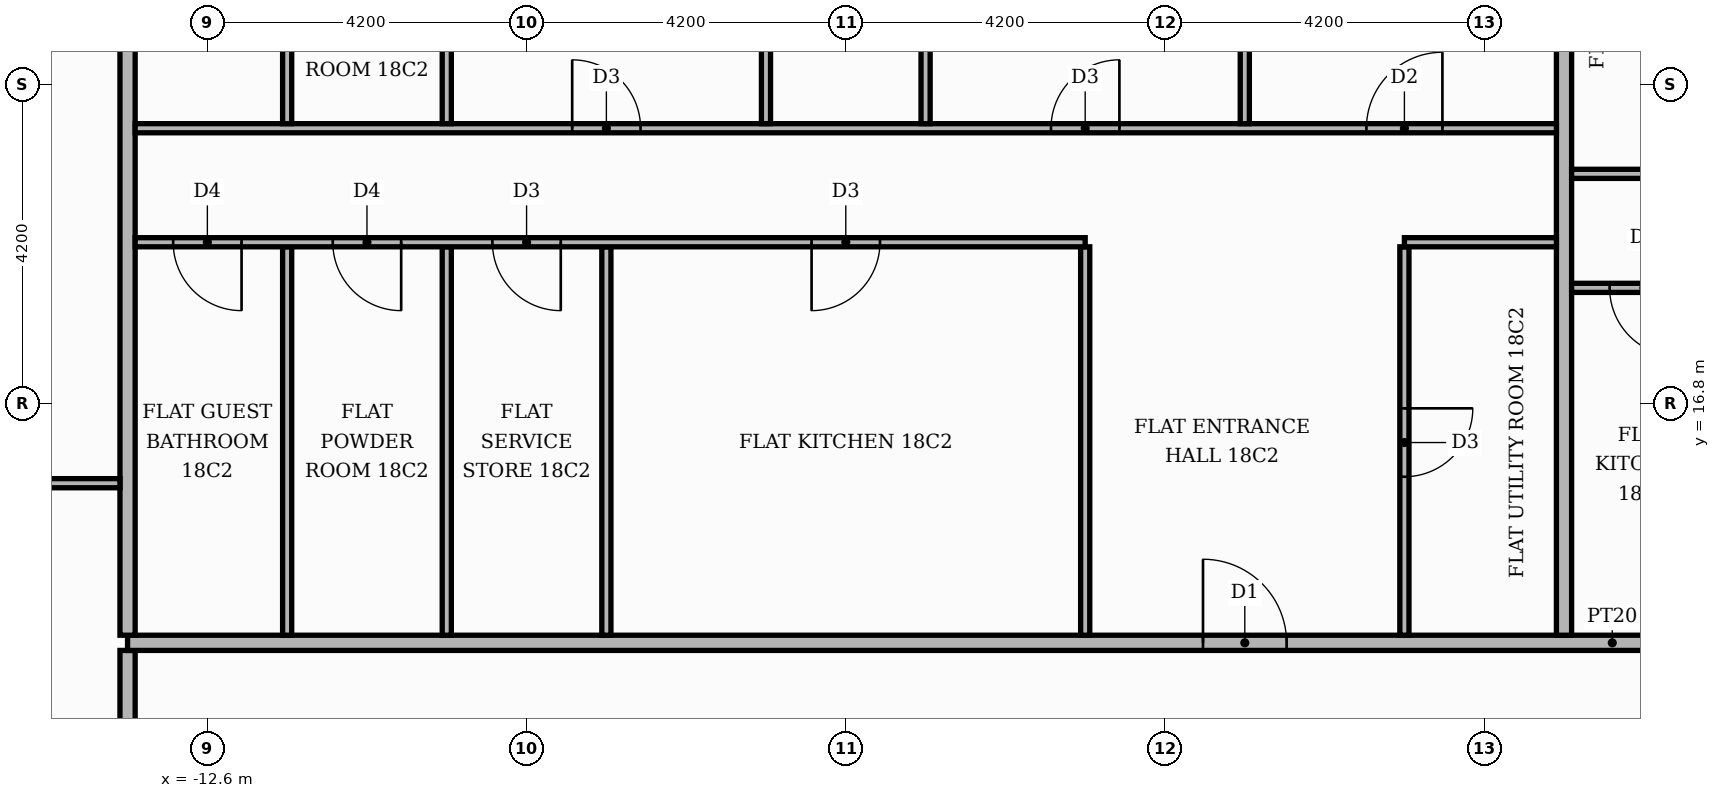
"""IFC4 building model, lengths in metres.
Left out: names, types, materials, properties, quantities, classifications, styles, units other than length and angle.
Written with IfcOpenShell. Run it as: python <this file> out.ifc"""

import sys

from ifc_helpers import new_model, si_unit, direction, frame, frame_2d, origin, place, context, subcontext, project, spatial, rectangle, extrude, element, fill, save


model = new_model("IFC4")
c1 = context("Model", 3, precision=1e-05, world=origin(), true_north=direction((0.0, 1.0)))
c2 = subcontext(c1, "Body", "Model", "MODEL_VIEW")
j1 = project(units=[si_unit("LENGTHUNIT", "METRE"), si_unit("PLANEANGLEUNIT", "RADIAN")], contexts=[c1])
p1 = place(None, origin())
s1 = spatial("IfcSite", under=j1, at=p1, CompositionType="ELEMENT")
p2 = place(p1, origin())
s2 = spatial("IfcBuilding", under=s1, at=p2, CompositionType="ELEMENT")
p3 = place(p2, frame((0.0, 0.0, 79.2)))
s3 = spatial("IfcBuildingStorey", under=s2, at=p3, CompositionType="ELEMENT", Elevation=79.2)
p4 = place(p3, frame((-13.65, 5.35, 0.0), z_axis=(0.0, 0.0, 1.0), x_axis=(0.0, 1.0, 0.0)))
e1 = element("IfcWall", 1, at=p4, inside=s3, PredefinedType="PARTITIONING", context=c2, shape_type="SweptSolid", body=[
    extrude(rectangle(XDim=8.2, YDim=0.2, at=frame_2d((4.1, 0.0))), origin(), (0.0, 0.0, 1.0), 3.48),
])
p5 = place(p4, frame((5.65, 0.0, 0.0)))
e2 = element("IfcOpeningElement", 2, at=p5, cuts=e1, PredefinedType="OPENING", context=c2, shape_type="SweptSolid", body=[
    extrude(rectangle(XDim=1.1, YDim=2.4, at=frame_2d((0.55, 1.2))), frame((0.0, 0.11, 0.0), z_axis=(0.0, -1.0, 0.0), x_axis=(1.0, 0.0, 0.0)), (0.0, 0.0, 1.0), 0.22),
])
p6 = place(p3, frame((-13.65, 13.65, 0.0), z_axis=(0.0, 0.0, 1.0), x_axis=(1.0, 0.0, 0.0)))
e3 = element("IfcWall", 3, at=p6, inside=s3, PredefinedType="PARTITIONING", context=c2, shape_type="SweptSolid", body=[
    extrude(rectangle(XDim=39.07, YDim=0.2, at=frame_2d((19.535, 0.0))), origin(), (0.0, 0.0, 1.0), 3.48),
])
p7 = place(p6, frame((24.65, 0.0, 0.0)))
e4 = element("IfcOpeningElement", 4, at=p7, cuts=e3, PredefinedType="OPENING", context=c2, shape_type="SweptSolid", body=[
    extrude(rectangle(XDim=1.1, YDim=2.4, at=frame_2d((0.55, 1.2))), frame((0.0, 0.11, 0.0), z_axis=(0.0, -1.0, 0.0), x_axis=(1.0, 0.0, 0.0)), (0.0, 0.0, 1.0), 0.22),
])
p8 = place(p6, frame((14.15, 0.0, 0.0)))
e5 = element("IfcOpeningElement", 5, at=p8, cuts=e3, PredefinedType="OPENING", context=c2, shape_type="SweptSolid", body=[
    extrude(rectangle(XDim=1.1, YDim=2.4, at=frame_2d((0.55, 1.2))), frame((0.0, 0.11, 0.0), z_axis=(0.0, -1.0, 0.0), x_axis=(1.0, 0.0, 0.0)), (0.0, 0.0, 1.0), 0.22),
])
p9 = place(p3, frame((-13.65, 13.75, 0.0), z_axis=(0.0, 0.0, 1.0), x_axis=(0.0, 1.0, 0.0)))
e6 = element("IfcWall", 6, at=p9, inside=s3, PredefinedType="PARTITIONING", context=c2, shape_type="SweptSolid", body=[
    extrude(rectangle(XDim=11.67, YDim=0.2, at=frame_2d((5.835, 0.0))), origin(), (0.0, 0.0, 1.0), 3.48),
])
for number, where, z_axis, x_axis in (
    (7, (-11.55, 13.75, 0.0), (0.0, 0.0, 1.0), (0.0, 1.0, 0.0)),
    (8, (-9.45, 13.75, 0.0), (0.0, 0.0, 1.0), (0.0, 1.0, 0.0)),
    (9, (-7.35, 13.75, 0.0), (0.0, 0.0, 1.0), (0.0, 1.0, 0.0)),
    (10, (-1.05, 13.75, 0.0), (0.0, 0.0, 1.0), (0.0, 1.0, 0.0)),
):
    element("IfcWall", number, at=place(p3, frame(where, z_axis=z_axis, x_axis=x_axis)), inside=s3, PredefinedType="PARTITIONING", context=c2, shape_type="SweptSolid", body=[
        extrude(rectangle(XDim=5.11, YDim=0.12, at=frame_2d((2.555, 0.0))), origin(), (0.0, 0.0, 1.0), 3.48),
    ])
p10 = place(p3, frame((3.15, 13.75, 0.0), z_axis=(0.0, 0.0, 1.0), x_axis=(0.0, 1.0, 0.0)))
e11 = element("IfcWall", 11, at=p10, inside=s3, PredefinedType="PARTITIONING", context=c2, shape_type="SweptSolid", body=[
    extrude(rectangle(XDim=5.11, YDim=0.12, at=frame_2d((2.555, 0.0))), origin(), (0.0, 0.0, 1.0), 3.48),
])
p11 = place(p10, frame((2.085, 0.0, 0.0)))
e12 = element("IfcOpeningElement", 12, at=p11, cuts=e11, PredefinedType="OPENING", context=c2, shape_type="SweptSolid", body=[
    extrude(rectangle(XDim=0.9, YDim=2.1, at=frame_2d((0.45, 1.05))), frame((0.0, 0.07, 0.0), z_axis=(0.0, -1.0, 0.0), x_axis=(1.0, 0.0, 0.0)), (0.0, 0.0, 1.0), 0.14),
])
p12 = place(p3, frame((5.25, 13.75, 0.0), z_axis=(0.0, 0.0, 1.0), x_axis=(0.0, 1.0, 0.0)))
e13 = element("IfcWall", 13, at=p12, inside=s3, PredefinedType="PARTITIONING", context=c2, shape_type="SweptSolid", body=[
    extrude(rectangle(XDim=11.67, YDim=0.2, at=frame_2d((5.835, 0.0))), origin(), (0.0, 0.0, 1.0), 3.48),
])
p13 = place(p3, frame((-19.82, 15.75, 0.0), z_axis=(0.0, 0.0, 1.0), x_axis=(1.0, 0.0, 0.0)))
e14 = element("IfcWall", 14, at=p13, inside=s3, PredefinedType="PARTITIONING", context=c2, shape_type="SweptSolid", body=[
    extrude(rectangle(XDim=6.07, YDim=0.12, at=frame_2d((3.035, 0.0))), origin(), (0.0, 0.0, 1.0), 3.48),
])
p14 = place(p13, frame((2.585, 0.0, 0.0)))
e15 = element("IfcOpeningElement", 15, at=p14, cuts=e14, PredefinedType="OPENING", context=c2, shape_type="SweptSolid", body=[
    extrude(rectangle(XDim=1.0, YDim=2.1, at=frame_2d((0.5, 1.05))), frame((0.0, 0.07, 0.0), z_axis=(0.0, -1.0, 0.0), x_axis=(1.0, 0.0, 0.0)), (0.0, 0.0, 1.0), 0.14),
])
p15 = place(p3, frame((5.35, 18.32, 0.0), z_axis=(0.0, 0.0, 1.0), x_axis=(1.0, 0.0, 0.0)))
e16 = element("IfcWall", 16, at=p15, inside=s3, PredefinedType="PARTITIONING", context=c2, shape_type="SweptSolid", body=[
    extrude(rectangle(XDim=4.1, YDim=0.12, at=frame_2d((2.05, 0.0))), origin(), (0.0, 0.0, 1.0), 3.48),
])
p16 = place(p15, frame((0.5, 0.0, 0.0)))
e17 = element("IfcOpeningElement", 17, at=p16, cuts=e16, PredefinedType="OPENING", context=c2, shape_type="SweptSolid", body=[
    extrude(rectangle(XDim=0.9, YDim=2.1, at=frame_2d((0.45, 1.05))), frame((0.0, 0.07, 0.0), z_axis=(0.0, -1.0, 0.0), x_axis=(1.0, 0.0, 0.0)), (0.0, 0.0, 1.0), 0.14),
])
p17 = place(p3, frame((-13.55, 18.92, 0.0), z_axis=(0.0, 0.0, 1.0), x_axis=(1.0, 0.0, 0.0)))
e18 = element("IfcWall", 18, at=p17, inside=s3, PredefinedType="PARTITIONING", context=c2, shape_type="SweptSolid", body=[
    extrude(rectangle(XDim=12.5, YDim=0.12, at=frame_2d((6.25, 0.0))), origin(), (0.0, 0.0, 1.0), 3.48),
])
p18 = place(p17, frame((8.9, 0.0, 0.0)))
e19 = element("IfcOpeningElement", 19, at=p18, cuts=e18, PredefinedType="OPENING", context=c2, shape_type="SweptSolid", body=[
    extrude(rectangle(XDim=0.9, YDim=2.1, at=frame_2d((0.45, 1.05))), frame((0.0, 0.07, 0.0), z_axis=(0.0, -1.0, 0.0), x_axis=(1.0, 0.0, 0.0)), (0.0, 0.0, 1.0), 0.14),
])
p19 = place(p17, frame((4.7, 0.0, 0.0)))
e20 = element("IfcOpeningElement", 20, at=p19, cuts=e18, PredefinedType="OPENING", context=c2, shape_type="SweptSolid", body=[
    extrude(rectangle(XDim=0.9, YDim=2.1, at=frame_2d((0.45, 1.05))), frame((0.0, 0.07, 0.0), z_axis=(0.0, -1.0, 0.0), x_axis=(1.0, 0.0, 0.0)), (0.0, 0.0, 1.0), 0.14),
])
p20 = place(p17, frame((2.6, 0.0, 0.0)))
e21 = element("IfcOpeningElement", 21, at=p20, cuts=e18, PredefinedType="OPENING", context=c2, shape_type="SweptSolid", body=[
    extrude(rectangle(XDim=0.9, YDim=2.1, at=frame_2d((0.45, 1.05))), frame((0.0, 0.07, 0.0), z_axis=(0.0, -1.0, 0.0), x_axis=(1.0, 0.0, 0.0)), (0.0, 0.0, 1.0), 0.14),
])
p21 = place(p17, frame((0.5, 0.0, 0.0)))
e22 = element("IfcOpeningElement", 22, at=p21, cuts=e18, PredefinedType="OPENING", context=c2, shape_type="SweptSolid", body=[
    extrude(rectangle(XDim=0.9, YDim=2.1, at=frame_2d((0.45, 1.05))), frame((0.0, 0.07, 0.0), z_axis=(0.0, -1.0, 0.0), x_axis=(1.0, 0.0, 0.0)), (0.0, 0.0, 1.0), 0.14),
])
p22 = place(p3, frame((3.15, 18.92, 0.0), z_axis=(0.0, 0.0, 1.0), x_axis=(1.0, 0.0, 0.0)))
e23 = element("IfcWall", 23, at=p22, inside=s3, PredefinedType="PARTITIONING", context=c2, shape_type="SweptSolid", body=[
    extrude(rectangle(XDim=2.0, YDim=0.12, at=frame_2d((1.0, 0.0))), origin(), (0.0, 0.0, 1.0), 3.48),
])
p23 = place(p3, frame((5.35, 19.82, 0.0), z_axis=(0.0, 0.0, 1.0), x_axis=(1.0, 0.0, 0.0)))
e24 = element("IfcWall", 24, at=p23, inside=s3, PredefinedType="PARTITIONING", context=c2, shape_type="SweptSolid", body=[
    extrude(rectangle(XDim=12.05, YDim=0.12, at=frame_2d((6.025, 0.0))), origin(), (0.0, 0.0, 1.0), 3.48),
])
p24 = place(p23, frame((8.85, 0.0, 0.0)))
e25 = element("IfcOpeningElement", 25, at=p24, cuts=e24, PredefinedType="OPENING", context=c2, shape_type="SweptSolid", body=[
    extrude(rectangle(XDim=1.0, YDim=2.1, at=frame_2d((0.5, 1.05))), frame((0.0, 0.07, 0.0), z_axis=(0.0, -1.0, 0.0), x_axis=(1.0, 0.0, 0.0)), (0.0, 0.0, 1.0), 0.14),
])
p25 = place(p23, frame((5.75, 0.0, 0.0)))
e26 = element("IfcOpeningElement", 26, at=p25, cuts=e24, PredefinedType="OPENING", context=c2, shape_type="SweptSolid", body=[
    extrude(rectangle(XDim=0.9, YDim=2.1, at=frame_2d((0.45, 1.05))), frame((0.0, 0.07, 0.0), z_axis=(0.0, -1.0, 0.0), x_axis=(1.0, 0.0, 0.0)), (0.0, 0.0, 1.0), 0.14),
])
p26 = place(p3, frame((-13.55, 20.42, 0.0), z_axis=(0.0, 0.0, 1.0), x_axis=(1.0, 0.0, 0.0)))
e27 = element("IfcWall", 27, at=p26, inside=s3, PredefinedType="PARTITIONING", context=c2, shape_type="SweptSolid", body=[
    extrude(rectangle(XDim=18.7, YDim=0.12, at=frame_2d((9.35, 0.0))), origin(), (0.0, 0.0, 1.0), 3.48),
])
p27 = place(p26, frame((16.2, 0.0, 0.0)))
e28 = element("IfcOpeningElement", 28, at=p27, cuts=e27, PredefinedType="OPENING", context=c2, shape_type="SweptSolid", body=[
    extrude(rectangle(XDim=1.0, YDim=2.1, at=frame_2d((0.5, 1.05))), frame((0.0, 0.07, 0.0), z_axis=(0.0, -1.0, 0.0), x_axis=(1.0, 0.0, 0.0)), (0.0, 0.0, 1.0), 0.14),
])
p28 = place(p26, frame((12.05, 0.0, 0.0)))
e29 = element("IfcOpeningElement", 29, at=p28, cuts=e27, PredefinedType="OPENING", context=c2, shape_type="SweptSolid", body=[
    extrude(rectangle(XDim=0.9, YDim=2.1, at=frame_2d((0.45, 1.05))), frame((0.0, 0.07, 0.0), z_axis=(0.0, -1.0, 0.0), x_axis=(1.0, 0.0, 0.0)), (0.0, 0.0, 1.0), 0.14),
])
p29 = place(p26, frame((5.75, 0.0, 0.0)))
e30 = element("IfcOpeningElement", 30, at=p29, cuts=e27, PredefinedType="OPENING", context=c2, shape_type="SweptSolid", body=[
    extrude(rectangle(XDim=0.9, YDim=2.1, at=frame_2d((0.45, 1.05))), frame((0.0, 0.07, 0.0), z_axis=(0.0, -1.0, 0.0), x_axis=(1.0, 0.0, 0.0)), (0.0, 0.0, 1.0), 0.14),
])
p30 = place(p3, frame((-11.55, 20.48, 0.0), z_axis=(0.0, 0.0, 1.0), x_axis=(0.0, 1.0, 0.0)))
e31 = element("IfcWall", 31, at=p30, inside=s3, PredefinedType="PARTITIONING", context=c2, shape_type="SweptSolid", body=[
    extrude(rectangle(XDim=4.94, YDim=0.12, at=frame_2d((2.47, 0.0))), origin(), (0.0, 0.0, 1.0), 3.48),
])
p31 = place(p30, frame((2.14, 0.0, 0.0)))
e32 = element("IfcOpeningElement", 32, at=p31, cuts=e31, PredefinedType="OPENING", context=c2, shape_type="SweptSolid", body=[
    extrude(rectangle(XDim=0.9, YDim=2.1, at=frame_2d((0.45, 1.05))), frame((0.0, 0.07, 0.0), z_axis=(0.0, -1.0, 0.0), x_axis=(1.0, 0.0, 0.0)), (0.0, 0.0, 1.0), 0.14),
])
p32 = place(p3, frame((-9.45, 20.48, 0.0), z_axis=(0.0, 0.0, 1.0), x_axis=(0.0, 1.0, 0.0)))
e33 = element("IfcWall", 33, at=p32, inside=s3, PredefinedType="PARTITIONING", context=c2, shape_type="SweptSolid", body=[
    extrude(rectangle(XDim=4.94, YDim=0.12, at=frame_2d((2.47, 0.0))), origin(), (0.0, 0.0, 1.0), 3.48),
])
p33 = place(p32, frame((2.14, 0.0, 0.0)))
e34 = element("IfcOpeningElement", 34, at=p33, cuts=e33, PredefinedType="OPENING", context=c2, shape_type="SweptSolid", body=[
    extrude(rectangle(XDim=0.9, YDim=2.1, at=frame_2d((0.45, 1.05))), frame((0.0, 0.07, 0.0), z_axis=(0.0, -1.0, 0.0), x_axis=(1.0, 0.0, 0.0)), (0.0, 0.0, 1.0), 0.14),
])
p34 = place(p3, frame((-5.25, 20.48, 0.0), z_axis=(0.0, 0.0, 1.0), x_axis=(0.0, 1.0, 0.0)))
e35 = element("IfcWall", 35, at=p34, inside=s3, PredefinedType="PARTITIONING", context=c2, shape_type="SweptSolid", body=[
    extrude(rectangle(XDim=4.94, YDim=0.12, at=frame_2d((2.47, 0.0))), origin(), (0.0, 0.0, 1.0), 3.48),
])
p35 = place(p3, frame((-3.15, 20.48, 0.0), z_axis=(0.0, 0.0, 1.0), x_axis=(0.0, 1.0, 0.0)))
e36 = element("IfcWall", 36, at=p35, inside=s3, PredefinedType="PARTITIONING", context=c2, shape_type="SweptSolid", body=[
    extrude(rectangle(XDim=4.94, YDim=0.12, at=frame_2d((2.47, 0.0))), origin(), (0.0, 0.0, 1.0), 3.48),
])
p36 = place(p35, frame((2.14, 0.0, 0.0)))
e37 = element("IfcOpeningElement", 37, at=p36, cuts=e36, PredefinedType="OPENING", context=c2, shape_type="SweptSolid", body=[
    extrude(rectangle(XDim=0.9, YDim=2.1, at=frame_2d((0.45, 1.05))), frame((0.0, 0.07, 0.0), z_axis=(0.0, -1.0, 0.0), x_axis=(1.0, 0.0, 0.0)), (0.0, 0.0, 1.0), 0.14),
])
p37 = place(p3, frame((1.05, 20.48, 0.0), z_axis=(0.0, 0.0, 1.0), x_axis=(0.0, 1.0, 0.0)))
e38 = element("IfcWall", 38, at=p37, inside=s3, PredefinedType="PARTITIONING", context=c2, shape_type="SweptSolid", body=[
    extrude(rectangle(XDim=4.94, YDim=0.12, at=frame_2d((2.47, 0.0))), origin(), (0.0, 0.0, 1.0), 3.48),
])
p38 = place(p16, frame((0.9, 0.0, 0.0), z_axis=(0.0, 0.0, 1.0), x_axis=(-1.0, 0.0, 0.0)))
e39 = element("IfcDoor", 39, at=p38, inside=s3, OperationType="SINGLE_SWING_RIGHT", PredefinedType="DOOR", context=c2, shape_type="SweptSolid", body=[
    extrude(rectangle(XDim=0.9, YDim=2.1, at=frame_2d((0.45, 1.05))), frame((0.0, 0.025, 0.0), z_axis=(0.0, -1.0, 0.0), x_axis=(1.0, 0.0, 0.0)), (0.0, 0.0, 1.0), 0.05),
])
fill(e17, e39)
p39 = place(p8, origin())
e40 = element("IfcDoor", 40, at=p39, inside=s3, OperationType="SINGLE_SWING_LEFT", PredefinedType="DOOR", context=c2, shape_type="SweptSolid", body=[
    extrude(rectangle(XDim=1.1, YDim=2.4, at=frame_2d((0.55, 1.2))), frame((0.0, 0.025, 0.0), z_axis=(0.0, -1.0, 0.0), x_axis=(1.0, 0.0, 0.0)), (0.0, 0.0, 1.0), 0.05),
])
fill(e5, e40)
p40 = place(p11, frame((0.9, 0.0, 0.0), z_axis=(0.0, 0.0, 1.0), x_axis=(-1.0, 0.0, 0.0)))
e41 = element("IfcDoor", 41, at=p40, inside=s3, OperationType="SINGLE_SWING_RIGHT", PredefinedType="DOOR", context=c2, shape_type="SweptSolid", body=[
    extrude(rectangle(XDim=0.9, YDim=2.1, at=frame_2d((0.45, 1.05))), frame((0.0, 0.025, 0.0), z_axis=(0.0, -1.0, 0.0), x_axis=(1.0, 0.0, 0.0)), (0.0, 0.0, 1.0), 0.05),
])
fill(e12, e41)
p41 = place(p18, frame((0.9, 0.0, 0.0), z_axis=(0.0, 0.0, 1.0), x_axis=(-1.0, 0.0, 0.0)))
e42 = element("IfcDoor", 42, at=p41, inside=s3, OperationType="SINGLE_SWING_LEFT", PredefinedType="DOOR", context=c2, shape_type="SweptSolid", body=[
    extrude(rectangle(XDim=0.9, YDim=2.1, at=frame_2d((0.45, 1.05))), frame((0.0, 0.025, 0.0), z_axis=(0.0, -1.0, 0.0), x_axis=(1.0, 0.0, 0.0)), (0.0, 0.0, 1.0), 0.05),
])
fill(e19, e42)
p42 = place(p19, frame((0.9, 0.0, 0.0), z_axis=(0.0, 0.0, 1.0), x_axis=(-1.0, 0.0, 0.0)))
e43 = element("IfcDoor", 43, at=p42, inside=s3, OperationType="SINGLE_SWING_RIGHT", PredefinedType="DOOR", context=c2, shape_type="SweptSolid", body=[
    extrude(rectangle(XDim=0.9, YDim=2.1, at=frame_2d((0.45, 1.05))), frame((0.0, 0.025, 0.0), z_axis=(0.0, -1.0, 0.0), x_axis=(1.0, 0.0, 0.0)), (0.0, 0.0, 1.0), 0.05),
])
fill(e20, e43)
p43 = place(p20, frame((0.9, 0.0, 0.0), z_axis=(0.0, 0.0, 1.0), x_axis=(-1.0, 0.0, 0.0)))
e44 = element("IfcDoor", 44, at=p43, inside=s3, OperationType="SINGLE_SWING_RIGHT", PredefinedType="DOOR", context=c2, shape_type="SweptSolid", body=[
    extrude(rectangle(XDim=0.9, YDim=2.1, at=frame_2d((0.45, 1.05))), frame((0.0, 0.025, 0.0), z_axis=(0.0, -1.0, 0.0), x_axis=(1.0, 0.0, 0.0)), (0.0, 0.0, 1.0), 0.05),
])
fill(e21, e44)
p44 = place(p21, frame((0.9, 0.0, 0.0), z_axis=(0.0, 0.0, 1.0), x_axis=(-1.0, 0.0, 0.0)))
e45 = element("IfcDoor", 45, at=p44, inside=s3, OperationType="SINGLE_SWING_RIGHT", PredefinedType="DOOR", context=c2, shape_type="SweptSolid", body=[
    extrude(rectangle(XDim=0.9, YDim=2.1, at=frame_2d((0.45, 1.05))), frame((0.0, 0.025, 0.0), z_axis=(0.0, -1.0, 0.0), x_axis=(1.0, 0.0, 0.0)), (0.0, 0.0, 1.0), 0.05),
])
fill(e22, e45)
p45 = place(p27, origin())
e46 = element("IfcDoor", 46, at=p45, inside=s3, OperationType="SINGLE_SWING_RIGHT", PredefinedType="DOOR", context=c2, shape_type="SweptSolid", body=[
    extrude(rectangle(XDim=1.0, YDim=2.1, at=frame_2d((0.5, 1.05))), frame((0.0, 0.025, 0.0), z_axis=(0.0, -1.0, 0.0), x_axis=(1.0, 0.0, 0.0)), (0.0, 0.0, 1.0), 0.05),
])
fill(e28, e46)
p46 = place(p28, origin())
e47 = element("IfcDoor", 47, at=p46, inside=s3, OperationType="SINGLE_SWING_RIGHT", PredefinedType="DOOR", context=c2, shape_type="SweptSolid", body=[
    extrude(rectangle(XDim=0.9, YDim=2.1, at=frame_2d((0.45, 1.05))), frame((0.0, 0.025, 0.0), z_axis=(0.0, -1.0, 0.0), x_axis=(1.0, 0.0, 0.0)), (0.0, 0.0, 1.0), 0.05),
])
fill(e29, e47)
p47 = place(p29, origin())
e48 = element("IfcDoor", 48, at=p47, inside=s3, OperationType="SINGLE_SWING_LEFT", PredefinedType="DOOR", context=c2, shape_type="SweptSolid", body=[
    extrude(rectangle(XDim=0.9, YDim=2.1, at=frame_2d((0.45, 1.05))), frame((0.0, 0.025, 0.0), z_axis=(0.0, -1.0, 0.0), x_axis=(1.0, 0.0, 0.0)), (0.0, 0.0, 1.0), 0.05),
])
fill(e30, e48)
save(model, sys.argv[1])
